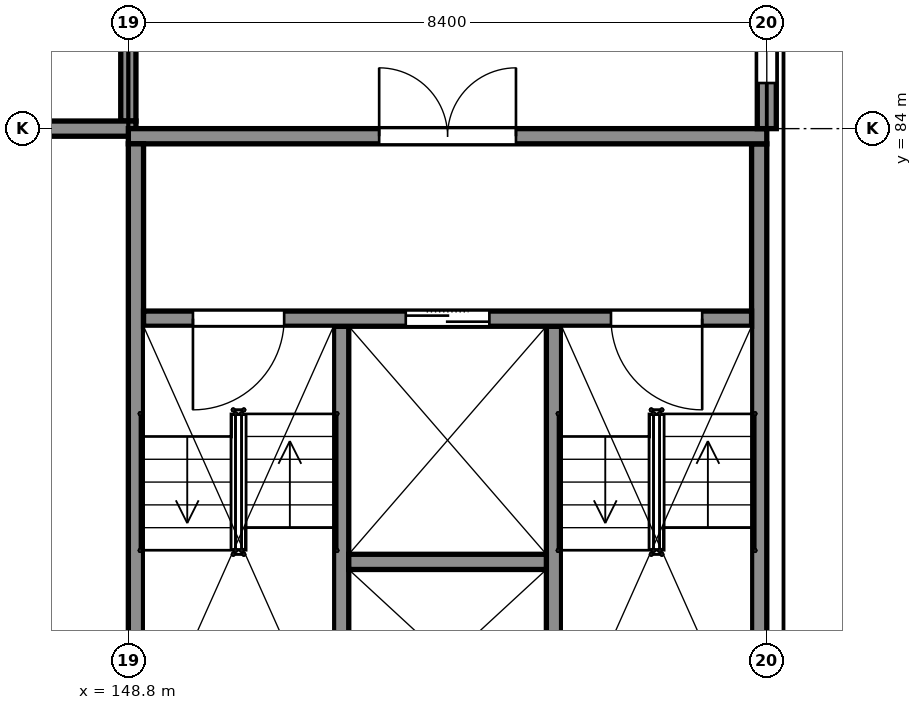
"""IFC4 building model, lengths in metres.
Left out: names, types, materials, properties, quantities, classifications, styles, units other than length and angle.
Written with IfcOpenShell. Run it as: python <this file> out.ifc"""

import sys

from ifc_helpers import new_model, si_unit, direction, frame, frame_2d, origin, place, context, subcontext, project, spatial, rectangle, extrude, element, fill, save


model = new_model("IFC4")
c1 = context("Model", 3, precision=1e-05, world=origin(), true_north=direction((0.0, 1.0)))
c2 = subcontext(c1, "Body", "Model", "MODEL_VIEW")
j1 = project(units=[si_unit("LENGTHUNIT", "METRE"), si_unit("PLANEANGLEUNIT", "RADIAN")], contexts=[c1])
p1 = place(None, origin())
s1 = spatial("IfcSite", under=j1, at=p1, CompositionType="ELEMENT")
p2 = place(p1, origin())
s2 = spatial("IfcBuilding", under=s1, at=p2, CompositionType="ELEMENT")
p3 = place(p2, frame((0.0, 0.0, 5.5)))
s3 = spatial("IfcBuildingStorey", under=s2, at=p3, CompositionType="ELEMENT", Elevation=5.5)
p4 = place(p3, frame((148.8, 83.9, 0.0), z_axis=(0.0, 0.0, 1.0), x_axis=(1.0, 0.0, 0.0)))
e1 = element("IfcWall", 1, at=p4, inside=s3, PredefinedType="SHEAR", context=c2, shape_type="SweptSolid", body=[
    extrude(rectangle(XDim=8.4, YDim=0.2, at=frame_2d((4.2, 0.0))), origin(), (0.0, 0.0, 1.0), 5.0),
])
p5 = place(p4, frame((3.3, 0.0, 0.0)))
e2 = element("IfcOpeningElement", 2, at=p5, cuts=e1, PredefinedType="OPENING", context=c2, shape_type="SweptSolid", body=[
    extrude(rectangle(XDim=1.8, YDim=2.1, at=frame_2d((0.9, 1.05))), frame((0.0, 0.11, 0.0), z_axis=(0.0, -1.0, 0.0), x_axis=(1.0, 0.0, 0.0)), (0.0, 0.0, 1.0), 0.22),
])
for number, where, z_axis, x_axis in (
    (3, (148.9, 75.8, 0.0), (0.0, 0.0, 1.0), (0.0, 1.0, 0.0)),
    (4, (157.1, 75.8, 0.0), (0.0, 0.0, 1.0), (0.0, 1.0, 0.0)),
):
    element("IfcWall", number, at=place(p3, frame(where, z_axis=z_axis, x_axis=x_axis)), inside=s3, PredefinedType="SHEAR", context=c2, shape_type="SweptSolid", body=[
        extrude(rectangle(XDim=8.0, YDim=0.2, at=frame_2d((4.0, 0.0))), origin(), (0.0, 0.0, 1.0), 5.0),
    ])
p6 = place(p3, frame((149.0, 81.5, 0.0), z_axis=(0.0, 0.0, 1.0), x_axis=(1.0, 0.0, 0.0)))
e5 = element("IfcWall", 5, at=p6, inside=s3, PredefinedType="SHEAR", context=c2, shape_type="SweptSolid", body=[
    extrude(rectangle(XDim=8.0, YDim=0.2, at=frame_2d((4.0, 0.0))), origin(), (0.0, 0.0, 1.0), 5.0),
])
p7 = place(p6, frame((0.65, 0.0, 0.0)))
e6 = element("IfcOpeningElement", 6, at=p7, cuts=e5, PredefinedType="OPENING", context=c2, shape_type="SweptSolid", body=[
    extrude(rectangle(XDim=1.2, YDim=2.1, at=frame_2d((0.6, 1.05))), frame((0.0, 0.11, 0.0), z_axis=(0.0, -1.0, 0.0), x_axis=(1.0, 0.0, 0.0)), (0.0, 0.0, 1.0), 0.22),
])
p8 = place(p6, frame((6.15, 0.0, 0.0)))
e7 = element("IfcOpeningElement", 7, at=p8, cuts=e5, PredefinedType="OPENING", context=c2, shape_type="SweptSolid", body=[
    extrude(rectangle(XDim=1.2, YDim=2.1, at=frame_2d((0.6, 1.05))), frame((0.0, 0.11, 0.0), z_axis=(0.0, -1.0, 0.0), x_axis=(1.0, 0.0, 0.0)), (0.0, 0.0, 1.0), 0.22),
])
p9 = place(p6, frame((3.45, 0.0, 0.0)))
e8 = element("IfcOpeningElement", 8, at=p9, cuts=e5, PredefinedType="OPENING", context=c2, shape_type="SweptSolid", body=[
    extrude(rectangle(XDim=1.1, YDim=2.1, at=frame_2d((0.55, 1.05))), frame((0.0, 0.11, 0.0), z_axis=(0.0, -1.0, 0.0), x_axis=(1.0, 0.0, 0.0)), (0.0, 0.0, 1.0), 0.22),
])
for number, where, z_axis, x_axis in (
    (9, (151.6, 75.8, 0.0), (0.0, 0.0, 1.0), (0.0, 1.0, 0.0)),
    (10, (154.4, 75.8, 0.0), (0.0, 0.0, 1.0), (0.0, 1.0, 0.0)),
):
    element("IfcWall", number, at=place(p3, frame(where, z_axis=z_axis, x_axis=x_axis)), inside=s3, PredefinedType="SHEAR", context=c2, shape_type="SweptSolid", body=[
        extrude(rectangle(XDim=5.6, YDim=0.2, at=frame_2d((2.8, 0.0))), origin(), (0.0, 0.0, 1.0), 5.0),
    ])
p10 = place(p3, frame((151.7, 78.3, 0.0), z_axis=(0.0, 0.0, 1.0), x_axis=(1.0, 0.0, 0.0)))
e11 = element("IfcWall", 11, at=p10, inside=s3, PredefinedType="SHEAR", context=c2, shape_type="SweptSolid", body=[
    extrude(rectangle(XDim=2.6, YDim=0.2, at=frame_2d((1.3, 0.0))), origin(), (0.0, 0.0, 1.0), 5.0),
])
p11 = place(p3, frame((157.2, 84.0, 0.0), z_axis=(0.0, 0.0, 1.0), x_axis=(0.0, 1.0, 0.0)))
e12 = element("IfcWall", 12, at=p11, inside=s3, PredefinedType="SOLIDWALL", context=c2, shape_type="SweptSolid", body=[
    extrude(rectangle(XDim=8.0, YDim=0.25, at=frame_2d((4.0, 0.0))), origin(), (0.0, 0.0, 1.0), 3.94),
])
p12 = place(p11, frame((0.6, 0.0, 0.9)))
e13 = element("IfcOpeningElement", 13, at=p12, cuts=e12, PredefinedType="OPENING", context=c2, shape_type="SweptSolid", body=[
    extrude(rectangle(XDim=1.2, YDim=2.1, at=frame_2d((0.6, 1.05))), frame((0.0, 0.135, 0.0), z_axis=(0.0, -1.0, 0.0), x_axis=(1.0, 0.0, 0.0)), (0.0, 0.0, 1.0), 0.27),
])
p13 = place(p11, frame((2.85, 0.0, 0.9)))
e14 = element("IfcOpeningElement", 14, at=p13, cuts=e12, PredefinedType="OPENING", context=c2, shape_type="SweptSolid", body=[
    extrude(rectangle(XDim=1.2, YDim=2.1, at=frame_2d((0.6, 1.05))), frame((0.0, 0.135, 0.0), z_axis=(0.0, -1.0, 0.0), x_axis=(1.0, 0.0, 0.0)), (0.0, 0.0, 1.0), 0.27),
])
p14 = place(p11, frame((6.2, 0.0, 0.9)))
e15 = element("IfcOpeningElement", 15, at=p14, cuts=e12, PredefinedType="OPENING", context=c2, shape_type="SweptSolid", body=[
    extrude(rectangle(XDim=1.2, YDim=2.1, at=frame_2d((0.6, 1.05))), frame((0.0, 0.135, 0.0), z_axis=(0.0, -1.0, 0.0), x_axis=(1.0, 0.0, 0.0)), (0.0, 0.0, 1.0), 0.27),
])
p15 = place(p3, frame((148.8, 84.1, 0.0), z_axis=(0.0, 0.0, 1.0), x_axis=(0.0, 1.0, 0.0)))
e16 = element("IfcWall", 16, at=p15, inside=s3, PredefinedType="PARTITIONING", context=c2, shape_type="SweptSolid", body=[
    extrude(rectangle(XDim=7.9, YDim=0.2, at=frame_2d((3.95, 0.0))), origin(), (0.0, 0.0, 1.0), 3.9),
])
p16 = place(p15, frame((0.975, 0.0, 0.0)))
e17 = element("IfcOpeningElement", 17, at=p16, cuts=e16, PredefinedType="OPENING", context=c2, shape_type="SweptSolid", body=[
    extrude(rectangle(XDim=2.4, YDim=2.4, at=frame_2d((1.2, 1.2))), frame((0.0, 0.11, 0.0), z_axis=(0.0, -1.0, 0.0), x_axis=(1.0, 0.0, 0.0)), (0.0, 0.0, 1.0), 0.22),
])
p17 = place(p3, frame((140.8, 84.0, 0.0), z_axis=(0.0, 0.0, 1.0), x_axis=(1.0, 0.0, 0.0)))
e18 = element("IfcWall", 18, at=p17, inside=s3, PredefinedType="PARTITIONING", context=c2, shape_type="SweptSolid", body=[
    extrude(rectangle(XDim=8.1, YDim=0.2, at=frame_2d((4.05, 0.0))), origin(), (0.0, 0.0, 1.0), 3.9),
])
p18 = place(p17, frame((4.525, 0.0, 0.0)))
e19 = element("IfcOpeningElement", 19, at=p18, cuts=e18, PredefinedType="OPENING", context=c2, shape_type="SweptSolid", body=[
    extrude(rectangle(XDim=2.4, YDim=2.4, at=frame_2d((1.2, 1.2))), frame((0.0, 0.11, 0.0), z_axis=(0.0, -1.0, 0.0), x_axis=(1.0, 0.0, 0.0)), (0.0, 0.0, 1.0), 0.22),
])
p19 = place(p12, origin())
e20 = element("IfcWindow", 20, at=p19, inside=s3, PartitioningType="SINGLE_PANEL", PredefinedType="WINDOW", context=c2, shape_type="SweptSolid", body=[
    extrude(rectangle(XDim=1.2, YDim=2.1, at=frame_2d((0.6, 1.05))), frame((0.0, 0.105, 0.0), z_axis=(0.0, -1.0, 0.0), x_axis=(1.0, 0.0, 0.0)), (0.0, 0.0, 1.0), 0.06),
])
fill(e13, e20)
p20 = place(p5, origin())
e21 = element("IfcDoor", 21, at=p20, inside=s3, OperationType="DOUBLE_DOOR_SINGLE_SWING", PredefinedType="DOOR", context=c2, shape_type="SweptSolid", body=[
    extrude(rectangle(XDim=1.8, YDim=2.1, at=frame_2d((0.9, 1.05))), frame((0.0, 0.025, 0.0), z_axis=(0.0, -1.0, 0.0), x_axis=(1.0, 0.0, 0.0)), (0.0, 0.0, 1.0), 0.05),
])
fill(e2, e21)
p21 = place(p7, origin())
e22 = element("IfcDoor", 22, at=p21, inside=s3, OperationType="SINGLE_SWING_LEFT", PredefinedType="DOOR", context=c2, shape_type="SweptSolid", body=[
    extrude(rectangle(XDim=1.2, YDim=2.1, at=frame_2d((0.6, 1.05))), frame((0.0, 0.025, 0.0), z_axis=(0.0, -1.0, 0.0), x_axis=(1.0, 0.0, 0.0)), (0.0, 0.0, 1.0), 0.05),
])
fill(e6, e22)
p22 = place(p8, origin())
e23 = element("IfcDoor", 23, at=p22, inside=s3, OperationType="SINGLE_SWING_RIGHT", PredefinedType="DOOR", context=c2, shape_type="SweptSolid", body=[
    extrude(rectangle(XDim=1.2, YDim=2.1, at=frame_2d((0.6, 1.05))), frame((0.0, 0.025, 0.0), z_axis=(0.0, -1.0, 0.0), x_axis=(1.0, 0.0, 0.0)), (0.0, 0.0, 1.0), 0.05),
])
fill(e7, e23)
p23 = place(p9, origin())
e24 = element("IfcDoor", 24, at=p23, inside=s3, OperationType="DOUBLE_DOOR_SLIDING", PredefinedType="DOOR", context=c2, shape_type="SweptSolid", body=[
    extrude(rectangle(XDim=1.1, YDim=2.1, at=frame_2d((0.55, 1.05))), frame((0.0, 0.025, 0.0), z_axis=(0.0, -1.0, 0.0), x_axis=(1.0, 0.0, 0.0)), (0.0, 0.0, 1.0), 0.05),
])
fill(e8, e24)
save(model, sys.argv[1])
